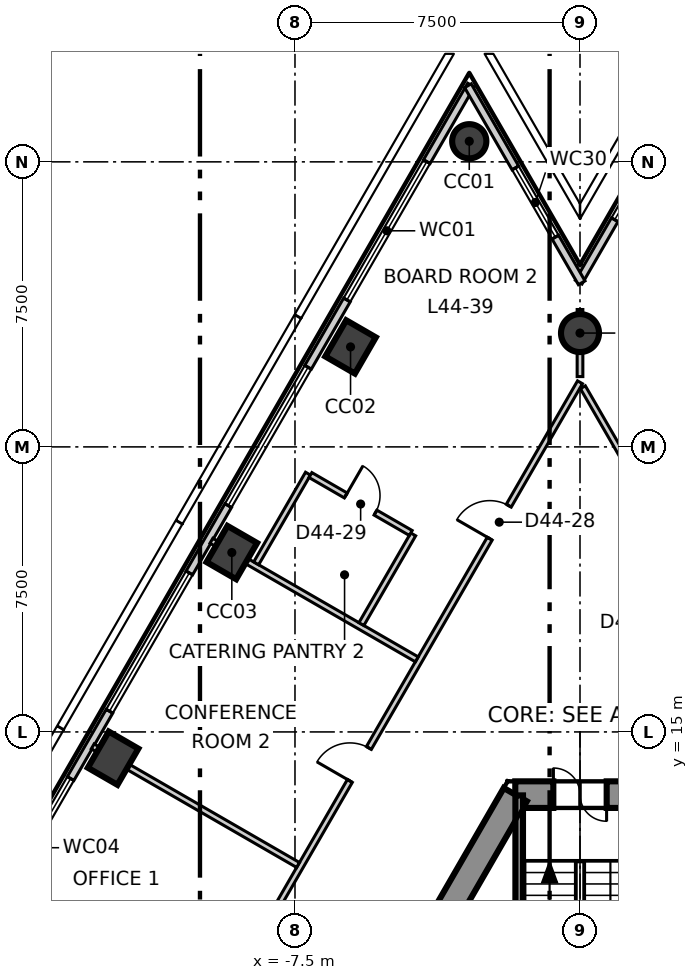
"""IFC4 building model, lengths in metres.
Left out: names, types, materials, properties, quantities, classifications, styles, units other than length and angle.
Written with IfcOpenShell. Run it as: python <this file> out.ifc"""

import sys

from ifc_helpers import new_model, si_unit, direction, frame, frame_2d, origin, origin_2d, place, context, subcontext, project, spatial, polyline, rectangle, circle, outline, extrude, element, fill, save


model = new_model("IFC4")
c1 = context("Model", 3, precision=1e-05, world=origin(), true_north=direction((0.0, 1.0)))
c2 = subcontext(c1, "Body", "Model", "MODEL_VIEW")
j1 = project(units=[si_unit("LENGTHUNIT", "METRE"), si_unit("PLANEANGLEUNIT", "RADIAN")], contexts=[c1])
p1 = place(None, origin())
s1 = spatial("IfcSite", under=j1, at=p1, CompositionType="ELEMENT")
p2 = place(p1, origin())
s2 = spatial("IfcBuilding", under=s1, at=p2, CompositionType="ELEMENT")
p3 = place(p2, frame((0.0, 0.0, 191.3)))
s3 = spatial("IfcBuildingStorey", under=s2, at=p3, CompositionType="ELEMENT", Elevation=191.3)
p4 = place(p3, frame((1.703, 13.35, -0.3), z_axis=(0.0, 0.0, 1.0), x_axis=(-1.0, 0.0, 0.0)))
e1 = element("IfcWall", 1, at=p4, inside=s3, PredefinedType="SHEAR", context=c2, shape_type="SweptSolid", body=[
    extrude(outline(polyline([(-0.202, -0.35), (1.703, -0.35), (3.608, -0.35), (3.204, 0.35), (1.703, 0.35), (0.202, 0.35), (-0.202, -0.35)])), origin(), (0.0, 0.0, 1.0), 4.0),
])
p5 = place(p4, frame((1.003, 0.0, 0.3)))
e2 = element("IfcOpeningElement", 2, at=p5, cuts=e1, PredefinedType="OPENING", context=c2, shape_type="SweptSolid", body=[
    extrude(rectangle(XDim=1.4, YDim=2.1, at=frame_2d((0.7, 1.05))), frame((0.0, 0.36, 0.0), z_axis=(0.0, -1.0, 0.0), x_axis=(1.0, 0.0, 0.0)), (0.0, 0.0, 1.0), 0.72),
])
p6 = place(p3, frame((-1.703, 13.35, -0.3), z_axis=(0.0, 0.0, 1.0), x_axis=(-0.500011533395, -0.866018744874, 0.0)))
e3 = element("IfcWall", 3, at=p6, inside=s3, PredefinedType="SHEAR", context=c2, shape_type="SweptSolid", body=[
    extrude(outline(polyline([(-0.202, -0.35), (1.782, -0.35), (3.766, -0.35), (5.75, -0.35), (7.734, -0.35), (9.718, -0.35), (11.702, -0.35), (13.686, -0.35), (15.67, -0.35), (17.654, -0.35), (19.638, -0.35), (21.622, -0.35), (21.218, 0.35), (19.307, 0.35), (17.397, 0.35), (15.486, 0.35), (13.576, 0.35), (11.665, 0.35), (9.755, 0.35), (7.844, 0.35), (5.934, 0.35), (4.023, 0.35), (2.113, 0.35), (0.202, 0.35), (-0.202, -0.35)])), origin(), (0.0, 0.0, 1.0), 4.0),
])
p7 = place(p6, frame((10.16, 0.0, 0.3)))
e4 = element("IfcOpeningElement", 4, at=p7, cuts=e3, PredefinedType="OPENING", context=c2, shape_type="SweptSolid", body=[
    extrude(rectangle(XDim=1.1, YDim=2.1, at=frame_2d((0.55, 1.05))), frame((0.0, 0.36, 0.0), z_axis=(0.0, -1.0, 0.0), x_axis=(1.0, 0.0, 0.0)), (0.0, 0.0, 1.0), 0.72),
])
p8 = place(p3, frame((-2.914, 30.542, -0.3), z_axis=(0.0, 0.0, 1.0), x_axis=(0.5, 0.866025403784, 0.0)))
e5 = element("IfcColumn", 5, at=p8, inside=s3, PredefinedType="COLUMN", context=c2, shape_type="SweptSolid", body=[
    extrude(circle(Radius=0.45, at=origin_2d()), origin(), (0.0, 0.0, 1.0), 4.0),
])
for number, where, z_axis, x_axis in (
    (6, (-6.038, 25.131, -0.3), (0.0, 0.0, 1.0), (0.5, 0.866, 0.0)),
    (7, (-9.162, 19.72, -0.3), (0.0, 0.0, 1.0), (0.5, 0.866, 0.0)),
    (8, (-12.286, 14.309, -0.3), (0.0, 0.0, 1.0), (0.5, 0.866, 0.0)),
):
    element("IfcColumn", number, at=place(p3, frame(where, z_axis=z_axis, x_axis=x_axis)), inside=s3, PredefinedType="COLUMN", context=c2, shape_type="SweptSolid", body=[
        extrude(rectangle(XDim=1.1, YDim=0.9, at=origin_2d()), origin(), (0.0, 0.0, 1.0), 4.0),
    ])
p9 = place(p3, frame((0.0, 25.495, -0.3), z_axis=(0.0, 0.0, 1.0), x_axis=(1.0, 0.0, 0.0)))
e9 = element("IfcColumn", 9, at=p9, inside=s3, PredefinedType="COLUMN", context=c2, shape_type="SweptSolid", body=[
    extrude(circle(Radius=0.5, at=origin_2d()), origin(), (0.0, 0.0, 1.0), 4.0),
])
p10 = place(p3, frame((-2.869, 32.02, 0.0), z_axis=(0.0, 0.0, 1.0), x_axis=(-0.500006930241, -0.866021402571, 0.0)))
e10 = element("IfcWall", 10, at=p10, inside=s3, PredefinedType="ELEMENTEDWALL", context=c2, shape_type="SweptSolid", body=[
    extrude(rectangle(XDim=52.572, YDim=0.2, at=frame_2d((26.286, 0.0))), origin(), (0.0, 0.0, 1.0), 3.7),
])
p11 = place(p10, frame((2.327, 0.0, 0.9)))
e11 = element("IfcOpeningElement", 11, at=p11, cuts=e10, PredefinedType="OPENING", context=c2, shape_type="SweptSolid", body=[
    extrude(rectangle(XDim=4.2, YDim=2.5, at=frame_2d((2.1, 1.25))), frame((0.0, 0.11, 0.0), z_axis=(0.0, -1.0, 0.0), x_axis=(1.0, 0.0, 0.0)), (0.0, 0.0, 1.0), 0.22),
])
p12 = place(p10, frame((8.575, 0.0, 0.9)))
e12 = element("IfcOpeningElement", 12, at=p12, cuts=e10, PredefinedType="OPENING", context=c2, shape_type="SweptSolid", body=[
    extrude(rectangle(XDim=4.2, YDim=2.5, at=frame_2d((2.1, 1.25))), frame((0.0, 0.11, 0.0), z_axis=(0.0, -1.0, 0.0), x_axis=(1.0, 0.0, 0.0)), (0.0, 0.0, 1.0), 0.22),
])
p13 = place(p10, frame((14.823, 0.0, 0.9)))
e13 = element("IfcOpeningElement", 13, at=p13, cuts=e10, PredefinedType="OPENING", context=c2, shape_type="SweptSolid", body=[
    extrude(rectangle(XDim=4.2, YDim=2.5, at=frame_2d((2.1, 1.25))), frame((0.0, 0.11, 0.0), z_axis=(0.0, -1.0, 0.0), x_axis=(1.0, 0.0, 0.0)), (0.0, 0.0, 1.0), 0.22),
])
p14 = place(p10, frame((21.071, 0.0, 0.9)))
e14 = element("IfcOpeningElement", 14, at=p14, cuts=e10, PredefinedType="OPENING", context=c2, shape_type="SweptSolid", body=[
    extrude(rectangle(XDim=4.2, YDim=2.5, at=frame_2d((2.1, 1.25))), frame((0.0, 0.11, 0.0), z_axis=(0.0, -1.0, 0.0), x_axis=(1.0, 0.0, 0.0)), (0.0, 0.0, 1.0), 0.22),
])
p15 = place(p10, frame((27.319, 0.0, 0.9)))
e15 = element("IfcOpeningElement", 15, at=p15, cuts=e10, PredefinedType="OPENING", context=c2, shape_type="SweptSolid", body=[
    extrude(rectangle(XDim=4.2, YDim=2.5, at=frame_2d((2.1, 1.25))), frame((0.0, 0.11, 0.0), z_axis=(0.0, -1.0, 0.0), x_axis=(1.0, 0.0, 0.0)), (0.0, 0.0, 1.0), 0.22),
])
p16 = place(p10, frame((33.568, 0.0, 0.9)))
e16 = element("IfcOpeningElement", 16, at=p16, cuts=e10, PredefinedType="OPENING", context=c2, shape_type="SweptSolid", body=[
    extrude(rectangle(XDim=4.2, YDim=2.5, at=frame_2d((2.1, 1.25))), frame((0.0, 0.11, 0.0), z_axis=(0.0, -1.0, 0.0), x_axis=(1.0, 0.0, 0.0)), (0.0, 0.0, 1.0), 0.22),
])
p17 = place(p10, frame((39.816, 0.0, 0.9)))
e17 = element("IfcOpeningElement", 17, at=p17, cuts=e10, PredefinedType="OPENING", context=c2, shape_type="SweptSolid", body=[
    extrude(rectangle(XDim=4.2, YDim=2.5, at=frame_2d((2.1, 1.25))), frame((0.0, 0.11, 0.0), z_axis=(0.0, -1.0, 0.0), x_axis=(1.0, 0.0, 0.0)), (0.0, 0.0, 1.0), 0.22),
])
p18 = place(p10, frame((46.064, 0.0, 0.9)))
e18 = element("IfcOpeningElement", 18, at=p18, cuts=e10, PredefinedType="OPENING", context=c2, shape_type="SweptSolid", body=[
    extrude(rectangle(XDim=4.2, YDim=2.5, at=frame_2d((2.1, 1.25))), frame((0.0, 0.11, 0.0), z_axis=(0.0, -1.0, 0.0), x_axis=(1.0, 0.0, 0.0)), (0.0, 0.0, 1.0), 0.22),
])
p19 = place(p3, frame((2.959, 32.02, 0.0), z_axis=(0.0, 0.0, 1.0), x_axis=(-0.499967146315, -0.866044371037, 0.0)))
e19 = element("IfcWall", 19, at=p19, inside=s3, PredefinedType="ELEMENTEDWALL", context=c2, shape_type="SweptSolid", body=[
    extrude(rectangle(XDim=5.988, YDim=0.2, at=frame_2d((2.994, 0.0))), origin(), (0.0, 0.0, 1.0), 3.7),
])
p20 = place(p19, frame((1.99, 0.0, 0.9)))
e20 = element("IfcOpeningElement", 20, at=p20, cuts=e19, PredefinedType="OPENING", context=c2, shape_type="SweptSolid", body=[
    extrude(rectangle(XDim=2.1, YDim=2.5, at=frame_2d((1.05, 1.25))), frame((0.0, 0.11, 0.0), z_axis=(0.0, -1.0, 0.0), x_axis=(1.0, 0.0, 0.0)), (0.0, 0.0, 1.0), 0.22),
])
p21 = place(p3, frame((0.045, 26.817, 0.0), z_axis=(0.0, 0.0, 1.0), x_axis=(-0.499967146315, 0.866044371037, 0.0)))
e21 = element("IfcWall", 21, at=p21, inside=s3, PredefinedType="ELEMENTEDWALL", context=c2, shape_type="SweptSolid", body=[
    extrude(rectangle(XDim=5.988, YDim=0.2, at=frame_2d((2.994, 0.0))), origin(), (0.0, 0.0, 1.0), 3.7),
])
p22 = place(p21, frame((1.39, 0.0, 0.9)))
e22 = element("IfcOpeningElement", 22, at=p22, cuts=e21, PredefinedType="OPENING", context=c2, shape_type="SweptSolid", body=[
    extrude(rectangle(XDim=2.1, YDim=2.5, at=frame_2d((1.05, 1.25))), frame((0.0, 0.11, 0.0), z_axis=(0.0, -1.0, 0.0), x_axis=(1.0, 0.0, 0.0)), (0.0, 0.0, 1.0), 0.22),
])
p23 = place(p3, frame((-20.882, -11.969, 0.0), z_axis=(0.0, 0.0, 1.0), x_axis=(0.499998738735, 0.866026131975, 0.0)))
e23 = element("IfcWall", 23, at=p23, inside=s3, PredefinedType="PARTITIONING", context=c2, shape_type="SweptSolid", body=[
    extrude(rectangle(XDim=41.764, YDim=0.15, at=frame_2d((20.882, 0.0))), origin(), (0.0, 0.0, 1.0), 3.7),
])
p24 = place(p23, frame((37.014, 0.0, 0.0)))
e24 = element("IfcOpeningElement", 24, at=p24, cuts=e23, PredefinedType="OPENING", context=c2, shape_type="SweptSolid", body=[
    extrude(rectangle(XDim=1.0, YDim=2.1, at=frame_2d((0.5, 1.05))), frame((0.0, 0.085, 0.0), z_axis=(0.0, -1.0, 0.0), x_axis=(1.0, 0.0, 0.0)), (0.0, 0.0, 1.0), 0.17),
])
p25 = place(p23, frame((29.653, 0.0, 0.0)))
e25 = element("IfcOpeningElement", 25, at=p25, cuts=e23, PredefinedType="OPENING", context=c2, shape_type="SweptSolid", body=[
    extrude(rectangle(XDim=1.0, YDim=2.1, at=frame_2d((0.5, 1.05))), frame((0.0, 0.085, 0.0), z_axis=(0.0, -1.0, 0.0), x_axis=(1.0, 0.0, 0.0)), (0.0, 0.0, 1.0), 0.17),
])
p26 = place(p23, frame((23.405, 0.0, 0.0)))
e26 = element("IfcOpeningElement", 26, at=p26, cuts=e23, PredefinedType="OPENING", context=c2, shape_type="SweptSolid", body=[
    extrude(rectangle(XDim=1.0, YDim=2.1, at=frame_2d((0.5, 1.05))), frame((0.0, 0.085, 0.0), z_axis=(0.0, -1.0, 0.0), x_axis=(1.0, 0.0, 0.0)), (0.0, 0.0, 1.0), 0.17),
])
p27 = place(p23, frame((9.657, 0.0, 0.0)))
e27 = element("IfcOpeningElement", 27, at=p27, cuts=e23, PredefinedType="OPENING", context=c2, shape_type="SweptSolid", body=[
    extrude(rectangle(XDim=1.1, YDim=2.1, at=frame_2d((0.55, 1.05))), frame((0.0, 0.085, 0.0), z_axis=(0.0, -1.0, 0.0), x_axis=(1.0, 0.0, 0.0)), (0.0, 0.0, 1.0), 0.17),
])
p28 = place(p23, frame((18.757, 0.0, 0.0)))
e28 = element("IfcOpeningElement", 28, at=p28, cuts=e23, PredefinedType="OPENING", context=c2, shape_type="SweptSolid", body=[
    extrude(rectangle(XDim=0.9, YDim=2.1, at=frame_2d((0.45, 1.05))), frame((0.0, 0.085, 0.0), z_axis=(0.0, -1.0, 0.0), x_axis=(1.0, 0.0, 0.0)), (0.0, 0.0, 1.0), 0.17),
])
p29 = place(p23, frame((15.557, 0.0, 0.0)))
e29 = element("IfcOpeningElement", 29, at=p29, cuts=e23, PredefinedType="OPENING", context=c2, shape_type="SweptSolid", body=[
    extrude(rectangle(XDim=0.9, YDim=2.1, at=frame_2d((0.45, 1.05))), frame((0.0, 0.085, 0.0), z_axis=(0.0, -1.0, 0.0), x_axis=(1.0, 0.0, 0.0)), (0.0, 0.0, 1.0), 0.17),
])
p30 = place(p23, frame((12.657, 0.0, 0.0)))
e30 = element("IfcOpeningElement", 30, at=p30, cuts=e23, PredefinedType="OPENING", context=c2, shape_type="SweptSolid", body=[
    extrude(rectangle(XDim=1.0, YDim=2.1, at=frame_2d((0.5, 1.05))), frame((0.0, 0.085, 0.0), z_axis=(0.0, -1.0, 0.0), x_axis=(1.0, 0.0, 0.0)), (0.0, 0.0, 1.0), 0.17),
])
p31 = place(p23, frame((3.56, 0.0, 0.0)))
e31 = element("IfcOpeningElement", 31, at=p31, cuts=e23, PredefinedType="OPENING", context=c2, shape_type="SweptSolid", body=[
    extrude(rectangle(XDim=1.1, YDim=2.1, at=frame_2d((0.55, 1.05))), frame((0.0, 0.085, 0.0), z_axis=(0.0, -1.0, 0.0), x_axis=(1.0, 0.0, 0.0)), (0.0, 0.0, 1.0), 0.17),
])
for number, where, z_axis, x_axis in (
    (32, (-12.823, 14.619, 0.0), (0.0, 0.0, 1.0), (0.866, -0.5, 0.0)),
    (33, (-9.699, 20.03, 0.0), (0.0, 0.0, 1.0), (0.866, -0.5, 0.0)),
):
    element("IfcWall", number, at=place(p3, frame(where, z_axis=z_axis, x_axis=x_axis)), inside=s3, PredefinedType="PARTITIONING", context=c2, shape_type="SweptSolid", body=[
        extrude(rectangle(XDim=6.24, YDim=0.15, at=frame_2d((3.12, 0.0))), origin(), (0.0, 0.0, 1.0), 3.7),
    ])
p32 = place(p3, frame((0.0, 24.35, 0.0), z_axis=(0.0, 0.0, 1.0), x_axis=(0.0, 1.0, 0.0)))
e34 = element("IfcWall", 34, at=p32, inside=s3, PredefinedType="PARTITIONING", context=c2, shape_type="SweptSolid", body=[
    extrude(rectangle(XDim=1.765, YDim=0.15, at=frame_2d((0.882, 0.0))), origin(), (0.0, 0.0, 1.0), 3.2),
])
p33 = place(p3, frame((0.075, 24.07, 0.0), z_axis=(0.0, 0.0, 1.0), x_axis=(0.49999939571, -0.866025752671, 0.0)))
e35 = element("IfcWall", 35, at=p33, inside=s3, PredefinedType="PARTITIONING", context=c2, shape_type="SweptSolid", body=[
    extrude(rectangle(XDim=41.614, YDim=0.15, at=frame_2d((20.807, 0.0))), origin(), (0.0, 0.0, 1.0), 3.7),
])
p34 = place(p33, frame((37.015, 0.0, 0.0)))
e36 = element("IfcOpeningElement", 36, at=p34, cuts=e35, PredefinedType="OPENING", context=c2, shape_type="SweptSolid", body=[
    extrude(rectangle(XDim=1.1, YDim=2.1, at=frame_2d((0.55, 1.05))), frame((0.0, 0.085, 0.0), z_axis=(0.0, -1.0, 0.0), x_axis=(1.0, 0.0, 0.0)), (0.0, 0.0, 1.0), 0.17),
])
p35 = place(p33, frame((25.154, 0.0, 0.0)))
e37 = element("IfcOpeningElement", 37, at=p35, cuts=e35, PredefinedType="OPENING", context=c2, shape_type="SweptSolid", body=[
    extrude(rectangle(XDim=1.0, YDim=2.1, at=frame_2d((0.5, 1.05))), frame((0.0, 0.085, 0.0), z_axis=(0.0, -1.0, 0.0), x_axis=(1.0, 0.0, 0.0)), (0.0, 0.0, 1.0), 0.17),
])
p36 = place(p33, frame((31.454, 0.0, 0.0)))
e38 = element("IfcOpeningElement", 38, at=p36, cuts=e35, PredefinedType="OPENING", context=c2, shape_type="SweptSolid", body=[
    extrude(rectangle(XDim=0.9, YDim=2.1, at=frame_2d((0.45, 1.05))), frame((0.0, 0.085, 0.0), z_axis=(0.0, -1.0, 0.0), x_axis=(1.0, 0.0, 0.0)), (0.0, 0.0, 1.0), 0.17),
])
p37 = place(p33, frame((17.157, 0.0, 0.0)))
e39 = element("IfcOpeningElement", 39, at=p37, cuts=e35, PredefinedType="OPENING", context=c2, shape_type="SweptSolid", body=[
    extrude(rectangle(XDim=1.0, YDim=2.1, at=frame_2d((0.5, 1.05))), frame((0.0, 0.085, 0.0), z_axis=(0.0, -1.0, 0.0), x_axis=(1.0, 0.0, 0.0)), (0.0, 0.0, 1.0), 0.17),
])
p38 = place(p33, frame((6.609, 0.0, 0.0)))
e40 = element("IfcOpeningElement", 40, at=p38, cuts=e35, PredefinedType="OPENING", context=c2, shape_type="SweptSolid", body=[
    extrude(rectangle(XDim=1.1, YDim=2.1, at=frame_2d((0.55, 1.05))), frame((0.0, 0.085, 0.0), z_axis=(0.0, -1.0, 0.0), x_axis=(1.0, 0.0, 0.0)), (0.0, 0.0, 1.0), 0.17),
])
for number, where, z_axis, x_axis in (
    (41, (-8.521, 19.436, 0.0), (0.0, 0.0, 1.0), (0.5, 0.866, 0.0)),
    (42, (-5.752, 17.838, 0.0), (0.0, 0.0, 1.0), (0.5, 0.866, 0.0)),
):
    element("IfcWall", number, at=place(p3, frame(where, z_axis=z_axis, x_axis=x_axis)), inside=s3, PredefinedType="PARTITIONING", context=c2, shape_type="SweptSolid", body=[
        extrude(rectangle(XDim=2.725, YDim=0.15, at=frame_2d((1.363, 0.0))), origin(), (0.0, 0.0, 1.0), 3.7),
    ])
p39 = place(p3, frame((-7.093, 21.759, 0.0), z_axis=(0.0, 0.0, 1.0), x_axis=(0.865976105257, -0.500085377835, 0.0)))
e43 = element("IfcWall", 43, at=p39, inside=s3, PredefinedType="PARTITIONING", context=c2, shape_type="SweptSolid", body=[
    extrude(rectangle(XDim=3.047, YDim=0.15, at=frame_2d((1.524, 0.0))), origin(), (0.0, 0.0, 1.0), 3.7),
])
p40 = place(p39, frame((1.075, 0.0, 0.0)))
e44 = element("IfcOpeningElement", 44, at=p40, cuts=e43, PredefinedType="OPENING", context=c2, shape_type="SweptSolid", body=[
    extrude(rectangle(XDim=0.9, YDim=2.1, at=frame_2d((0.45, 1.05))), frame((0.0, 0.085, 0.0), z_axis=(0.0, -1.0, 0.0), x_axis=(1.0, 0.0, 0.0)), (0.0, 0.0, 1.0), 0.17),
])
p41 = place(p3, frame((-1.6, 6.615, 0.0), z_axis=(0.0, 0.0, 1.0), x_axis=(0.0, 1.0, 0.0)))
e45 = element("IfcWall", 45, at=p41, inside=s3, PredefinedType="SOLIDWALL", context=c2, shape_type="SweptSolid", body=[
    extrude(rectangle(XDim=6.715, YDim=0.2, at=frame_2d((3.357, 0.0))), origin(), (0.0, 0.0, 1.0), 3.7),
])
p42 = place(p11, origin())
e46 = element("IfcWindow", 46, at=p42, inside=s3, PartitioningType="SINGLE_PANEL", PredefinedType="WINDOW", context=c2, shape_type="SweptSolid", body=[
    extrude(rectangle(XDim=4.2, YDim=2.5, at=frame_2d((2.1, 1.25))), frame((0.0, 0.03, 0.0), z_axis=(0.0, -1.0, 0.0), x_axis=(1.0, 0.0, 0.0)), (0.0, 0.0, 1.0), 0.06),
])
fill(e11, e46)
p43 = place(p12, origin())
e47 = element("IfcWindow", 47, at=p43, inside=s3, PartitioningType="SINGLE_PANEL", PredefinedType="WINDOW", context=c2, shape_type="SweptSolid", body=[
    extrude(rectangle(XDim=4.2, YDim=2.5, at=frame_2d((2.1, 1.25))), frame((0.0, 0.03, 0.0), z_axis=(0.0, -1.0, 0.0), x_axis=(1.0, 0.0, 0.0)), (0.0, 0.0, 1.0), 0.06),
])
fill(e12, e47)
p44 = place(p13, origin())
e48 = element("IfcWindow", 48, at=p44, inside=s3, PartitioningType="SINGLE_PANEL", PredefinedType="WINDOW", context=c2, shape_type="SweptSolid", body=[
    extrude(rectangle(XDim=4.2, YDim=2.5, at=frame_2d((2.1, 1.25))), frame((0.0, 0.03, 0.0), z_axis=(0.0, -1.0, 0.0), x_axis=(1.0, 0.0, 0.0)), (0.0, 0.0, 1.0), 0.06),
])
fill(e13, e48)
p45 = place(p14, origin())
e49 = element("IfcWindow", 49, at=p45, inside=s3, PartitioningType="SINGLE_PANEL", PredefinedType="WINDOW", context=c2, shape_type="SweptSolid", body=[
    extrude(rectangle(XDim=4.2, YDim=2.5, at=frame_2d((2.1, 1.25))), frame((0.0, 0.03, 0.0), z_axis=(0.0, -1.0, 0.0), x_axis=(1.0, 0.0, 0.0)), (0.0, 0.0, 1.0), 0.06),
])
fill(e14, e49)
p46 = place(p20, origin())
e50 = element("IfcWindow", 50, at=p46, inside=s3, PartitioningType="SINGLE_PANEL", PredefinedType="WINDOW", context=c2, shape_type="SweptSolid", body=[
    extrude(rectangle(XDim=2.1, YDim=2.5, at=frame_2d((1.05, 1.25))), frame((0.0, 0.03, 0.0), z_axis=(0.0, -1.0, 0.0), x_axis=(1.0, 0.0, 0.0)), (0.0, 0.0, 1.0), 0.06),
])
fill(e20, e50)
p47 = place(p22, origin())
e51 = element("IfcWindow", 51, at=p47, inside=s3, PartitioningType="SINGLE_PANEL", PredefinedType="WINDOW", context=c2, shape_type="SweptSolid", body=[
    extrude(rectangle(XDim=2.1, YDim=2.5, at=frame_2d((1.05, 1.25))), frame((0.0, 0.03, 0.0), z_axis=(0.0, -1.0, 0.0), x_axis=(1.0, 0.0, 0.0)), (0.0, 0.0, 1.0), 0.06),
])
fill(e22, e51)
p48 = place(p24, origin())
e52 = element("IfcDoor", 52, at=p48, inside=s3, OperationType="SINGLE_SWING_RIGHT", PredefinedType="DOOR", context=c2, shape_type="SweptSolid", body=[
    extrude(rectangle(XDim=1.0, YDim=2.1, at=frame_2d((0.5, 1.05))), frame((0.0, 0.025, 0.0), z_axis=(0.0, -1.0, 0.0), x_axis=(1.0, 0.0, 0.0)), (0.0, 0.0, 1.0), 0.05),
])
fill(e24, e52)
p49 = place(p40, origin())
e53 = element("IfcDoor", 53, at=p49, inside=s3, OperationType="SINGLE_SWING_RIGHT", PredefinedType="DOOR", context=c2, shape_type="SweptSolid", body=[
    extrude(rectangle(XDim=0.9, YDim=2.1, at=frame_2d((0.45, 1.05))), frame((0.0, 0.025, 0.0), z_axis=(0.0, -1.0, 0.0), x_axis=(1.0, 0.0, 0.0)), (0.0, 0.0, 1.0), 0.05),
])
fill(e44, e53)
p50 = place(p25, origin())
e54 = element("IfcDoor", 54, at=p50, inside=s3, OperationType="SINGLE_SWING_RIGHT", PredefinedType="DOOR", context=c2, shape_type="SweptSolid", body=[
    extrude(rectangle(XDim=1.0, YDim=2.1, at=frame_2d((0.5, 1.05))), frame((0.0, 0.025, 0.0), z_axis=(0.0, -1.0, 0.0), x_axis=(1.0, 0.0, 0.0)), (0.0, 0.0, 1.0), 0.05),
])
fill(e25, e54)
p51 = place(p5, origin())
e55 = element("IfcDoor", 55, at=p51, inside=s3, OperationType="DOUBLE_DOOR_SINGLE_SWING", PredefinedType="DOOR", context=c2, shape_type="SweptSolid", body=[
    extrude(rectangle(XDim=1.4, YDim=2.1, at=frame_2d((0.7, 1.05))), frame((0.0, 0.025, 0.0), z_axis=(0.0, -1.0, 0.0), x_axis=(1.0, 0.0, 0.0)), (0.0, 0.0, 1.0), 0.05),
])
fill(e2, e55)
save(model, sys.argv[1])
